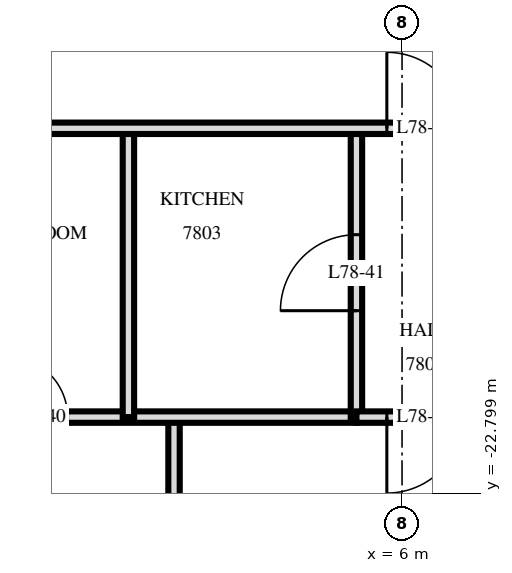
"""IFC4 building model, lengths in metres.
Left out: names, types, materials, properties, quantities, classifications, styles, units other than length and angle.
Written with IfcOpenShell. Run it as: python <this file> out.ifc"""

import sys

from ifc_helpers import new_model, si_unit, direction, frame, frame_2d, origin, place, context, subcontext, project, spatial, rectangle, extrude, element, fill, save


model = new_model("IFC4")
c1 = context("Model", 3, precision=1e-05, world=origin(), true_north=direction((0.0, 1.0)))
c2 = subcontext(c1, "Body", "Model", "MODEL_VIEW")
j1 = project(units=[si_unit("LENGTHUNIT", "METRE"), si_unit("PLANEANGLEUNIT", "RADIAN")], contexts=[c1])
p1 = place(None, origin())
s1 = spatial("IfcSite", under=j1, at=p1, CompositionType="ELEMENT")
p2 = place(p1, origin())
s2 = spatial("IfcBuilding", under=s1, at=p2, CompositionType="ELEMENT")
p3 = place(p2, frame((0.0, 0.0, 294.6)))
s3 = spatial("IfcBuildingStorey", under=s2, at=p3, CompositionType="ELEMENT", Elevation=294.6)
p4 = place(p3, frame((5.4, -21.8, 0.0), z_axis=(0.0, 0.0, 1.0), x_axis=(0.0, 1.0, 0.0)))
e1 = element("IfcWall", 1, at=p4, inside=s3, PredefinedType="PARTITIONING", context=c2, shape_type="SweptSolid", body=[
    extrude(rectangle(XDim=3.8, YDim=0.15, at=frame_2d((1.9, 0.0))), origin(), (0.0, 0.0, 1.0), 3.22),
])
p5 = place(p4, frame((1.4, 0.0, 0.0)))
e2 = element("IfcOpeningElement", 2, at=p5, cuts=e1, PredefinedType="OPENING", context=c2, shape_type="SweptSolid", body=[
    extrude(rectangle(XDim=1.0, YDim=2.1, at=frame_2d((0.5, 1.05))), frame((0.0, 0.085, 0.0), z_axis=(0.0, -1.0, 0.0), x_axis=(1.0, 0.0, 0.0)), (0.0, 0.0, 1.0), 0.17),
])
p6 = place(p3, frame((3.0, -33.62, 0.0), z_axis=(0.0, 0.0, 1.0), x_axis=(0.0, 1.0, 0.0)))
e3 = element("IfcWall", 3, at=p6, inside=s3, PredefinedType="PARTITIONING", context=c2, shape_type="SweptSolid", body=[
    extrude(rectangle(XDim=11.82, YDim=0.15, at=frame_2d((5.91, 0.0))), origin(), (0.0, 0.0, 1.0), 3.22),
])
p7 = place(p6, frame((5.37, 0.0, 0.0)))
e4 = element("IfcOpeningElement", 4, at=p7, cuts=e3, PredefinedType="OPENING", context=c2, shape_type="SweptSolid", body=[
    extrude(rectangle(XDim=0.9, YDim=2.1, at=frame_2d((0.45, 1.05))), frame((0.0, 0.085, 0.0), z_axis=(0.0, -1.0, 0.0), x_axis=(1.0, 0.0, 0.0)), (0.0, 0.0, 1.0), 0.17),
])
p8 = place(p3, frame((2.4, -21.8, 0.0), z_axis=(0.0, 0.0, 1.0), x_axis=(0.0, 1.0, 0.0)))
e5 = element("IfcWall", 5, at=p8, inside=s3, PredefinedType="PARTITIONING", context=c2, shape_type="SweptSolid", body=[
    extrude(rectangle(XDim=3.8, YDim=0.15, at=frame_2d((1.9, 0.0))), origin(), (0.0, 0.0, 1.0), 3.22),
])
p9 = place(p3, frame((5.4, -21.8, 0.0), z_axis=(0.0, 0.0, 1.0), x_axis=(1.0, 0.0, 0.0)))
e6 = element("IfcWall", 6, at=p9, inside=s3, PredefinedType="PARTITIONING", context=c2, shape_type="SweptSolid", body=[
    extrude(rectangle(XDim=1.8, YDim=0.15, at=frame_2d((0.9, 0.0))), origin(), (0.0, 0.0, 1.0), 3.22),
])
p10 = place(p9, frame((0.4, 0.0, 0.0)))
e7 = element("IfcOpeningElement", 7, at=p10, cuts=e6, PredefinedType="OPENING", context=c2, shape_type="SweptSolid", body=[
    extrude(rectangle(XDim=1.0, YDim=2.1, at=frame_2d((0.5, 1.05))), frame((0.0, 0.085, 0.0), z_axis=(0.0, -1.0, 0.0), x_axis=(1.0, 0.0, 0.0)), (0.0, 0.0, 1.0), 0.17),
])
p11 = place(p3, frame((0.0, -21.8, 0.0), z_axis=(0.0, 0.0, 1.0), x_axis=(1.0, 0.0, 0.0)))
e8 = element("IfcWall", 8, at=p11, inside=s3, PredefinedType="PARTITIONING", context=c2, shape_type="SweptSolid", body=[
    extrude(rectangle(XDim=5.4, YDim=0.15, at=frame_2d((2.7, 0.0))), origin(), (0.0, 0.0, 1.0), 3.22),
])
p12 = place(p11, frame((0.8, 0.0, 0.0)))
e9 = element("IfcOpeningElement", 9, at=p12, cuts=e8, PredefinedType="OPENING", context=c2, shape_type="SweptSolid", body=[
    extrude(rectangle(XDim=0.8, YDim=2.1, at=frame_2d((0.4, 1.05))), frame((0.0, 0.085, 0.0), z_axis=(0.0, -1.0, 0.0), x_axis=(1.0, 0.0, 0.0)), (0.0, 0.0, 1.0), 0.17),
])
p13 = place(p3, frame((-22.92, -18.0, 0.0), z_axis=(0.0, 0.0, 1.0), x_axis=(1.0, 0.0, 0.0)))
e10 = element("IfcWall", 10, at=p13, inside=s3, PredefinedType="PARTITIONING", context=c2, shape_type="SweptSolid", body=[
    extrude(rectangle(XDim=45.84, YDim=0.15, at=frame_2d((22.92, 0.0))), origin(), (0.0, 0.0, 1.0), 3.22),
])
p14 = place(p13, frame((17.07, 0.0, 0.0)))
e11 = element("IfcOpeningElement", 11, at=p14, cuts=e10, PredefinedType="OPENING", context=c2, shape_type="SweptSolid", body=[
    extrude(rectangle(XDim=1.0, YDim=2.1, at=frame_2d((0.5, 1.05))), frame((0.0, 0.085, 0.0), z_axis=(0.0, -1.0, 0.0), x_axis=(1.0, 0.0, 0.0)), (0.0, 0.0, 1.0), 0.17),
])
p15 = place(p13, frame((21.77, 0.0, 0.0)))
e12 = element("IfcOpeningElement", 12, at=p15, cuts=e10, PredefinedType="OPENING", context=c2, shape_type="SweptSolid", body=[
    extrude(rectangle(XDim=1.0, YDim=2.1, at=frame_2d((0.5, 1.05))), frame((0.0, 0.085, 0.0), z_axis=(0.0, -1.0, 0.0), x_axis=(1.0, 0.0, 0.0)), (0.0, 0.0, 1.0), 0.17),
])
p16 = place(p13, frame((28.72, 0.0, 0.0)))
e13 = element("IfcOpeningElement", 13, at=p16, cuts=e10, PredefinedType="OPENING", context=c2, shape_type="SweptSolid", body=[
    extrude(rectangle(XDim=1.0, YDim=2.1, at=frame_2d((0.5, 1.05))), frame((0.0, 0.085, 0.0), z_axis=(0.0, -1.0, 0.0), x_axis=(1.0, 0.0, 0.0)), (0.0, 0.0, 1.0), 0.17),
])
p17 = place(p13, frame((30.52, 0.0, 0.0)))
e14 = element("IfcOpeningElement", 14, at=p17, cuts=e10, PredefinedType="OPENING", context=c2, shape_type="SweptSolid", body=[
    extrude(rectangle(XDim=1.0, YDim=2.1, at=frame_2d((0.5, 1.05))), frame((0.0, 0.085, 0.0), z_axis=(0.0, -1.0, 0.0), x_axis=(1.0, 0.0, 0.0)), (0.0, 0.0, 1.0), 0.17),
])
p18 = place(p13, frame((9.42, 0.0, 0.0)))
e15 = element("IfcOpeningElement", 15, at=p18, cuts=e10, PredefinedType="OPENING", context=c2, shape_type="SweptSolid", body=[
    extrude(rectangle(XDim=1.0, YDim=2.1, at=frame_2d((0.5, 1.05))), frame((0.0, 0.085, 0.0), z_axis=(0.0, -1.0, 0.0), x_axis=(1.0, 0.0, 0.0)), (0.0, 0.0, 1.0), 0.17),
])
p19 = place(p13, frame((2.67, 0.0, 0.0)))
e16 = element("IfcOpeningElement", 16, at=p19, cuts=e10, PredefinedType="OPENING", context=c2, shape_type="SweptSolid", body=[
    extrude(rectangle(XDim=1.0, YDim=2.1, at=frame_2d((0.5, 1.05))), frame((0.0, 0.085, 0.0), z_axis=(0.0, -1.0, 0.0), x_axis=(1.0, 0.0, 0.0)), (0.0, 0.0, 1.0), 0.17),
])
p20 = place(p13, frame((38.42, 0.0, 0.0)))
e17 = element("IfcOpeningElement", 17, at=p20, cuts=e10, PredefinedType="OPENING", context=c2, shape_type="SweptSolid", body=[
    extrude(rectangle(XDim=1.0, YDim=2.1, at=frame_2d((0.5, 1.05))), frame((0.0, 0.085, 0.0), z_axis=(0.0, -1.0, 0.0), x_axis=(1.0, 0.0, 0.0)), (0.0, 0.0, 1.0), 0.17),
])
p21 = place(p13, frame((43.67, 0.0, 0.0)))
e18 = element("IfcOpeningElement", 18, at=p21, cuts=e10, PredefinedType="OPENING", context=c2, shape_type="SweptSolid", body=[
    extrude(rectangle(XDim=1.0, YDim=2.1, at=frame_2d((0.5, 1.05))), frame((0.0, 0.085, 0.0), z_axis=(0.0, -1.0, 0.0), x_axis=(1.0, 0.0, 0.0)), (0.0, 0.0, 1.0), 0.17),
])
p22 = place(p16, origin())
e19 = element("IfcDoor", 19, at=p22, inside=s3, OperationType="SINGLE_SWING_RIGHT", PredefinedType="DOOR", context=c2, shape_type="SweptSolid", body=[
    extrude(rectangle(XDim=1.0, YDim=2.1, at=frame_2d((0.5, 1.05))), frame((0.0, 0.025, 0.0), z_axis=(0.0, -1.0, 0.0), x_axis=(1.0, 0.0, 0.0)), (0.0, 0.0, 1.0), 0.05),
])
fill(e13, e19)
p23 = place(p12, origin())
e20 = element("IfcDoor", 20, at=p23, inside=s3, OperationType="SINGLE_SWING_RIGHT", PredefinedType="DOOR", context=c2, shape_type="SweptSolid", body=[
    extrude(rectangle(XDim=0.8, YDim=2.1, at=frame_2d((0.4, 1.05))), frame((0.0, 0.025, 0.0), z_axis=(0.0, -1.0, 0.0), x_axis=(1.0, 0.0, 0.0)), (0.0, 0.0, 1.0), 0.05),
])
fill(e9, e20)
p24 = place(p5, origin())
e21 = element("IfcDoor", 21, at=p24, inside=s3, OperationType="SINGLE_SWING_RIGHT", PredefinedType="DOOR", context=c2, shape_type="SweptSolid", body=[
    extrude(rectangle(XDim=1.0, YDim=2.1, at=frame_2d((0.5, 1.05))), frame((0.0, 0.025, 0.0), z_axis=(0.0, -1.0, 0.0), x_axis=(1.0, 0.0, 0.0)), (0.0, 0.0, 1.0), 0.05),
])
fill(e2, e21)
p25 = place(p10, frame((0.5, 0.0, 0.0), z_axis=(0.0, 0.0, 1.0), x_axis=(-1.0, 0.0, 0.0)))
e22 = element("IfcDoor", 22, at=p25, inside=s3, OperationType="SINGLE_SWING_LEFT", PredefinedType="DOOR", context=c2, shape_type="SweptSolid", body=[
    extrude(rectangle(XDim=1.0, YDim=2.1, at=frame_2d((0.0, 1.05))), frame((0.0, -0.025, 0.0), z_axis=(0.0, 1.0, 0.0), x_axis=(-1.0, 0.0, 0.0)), (0.0, 0.0, 1.0), 0.05),
])
fill(e7, e22)
save(model, sys.argv[1])
